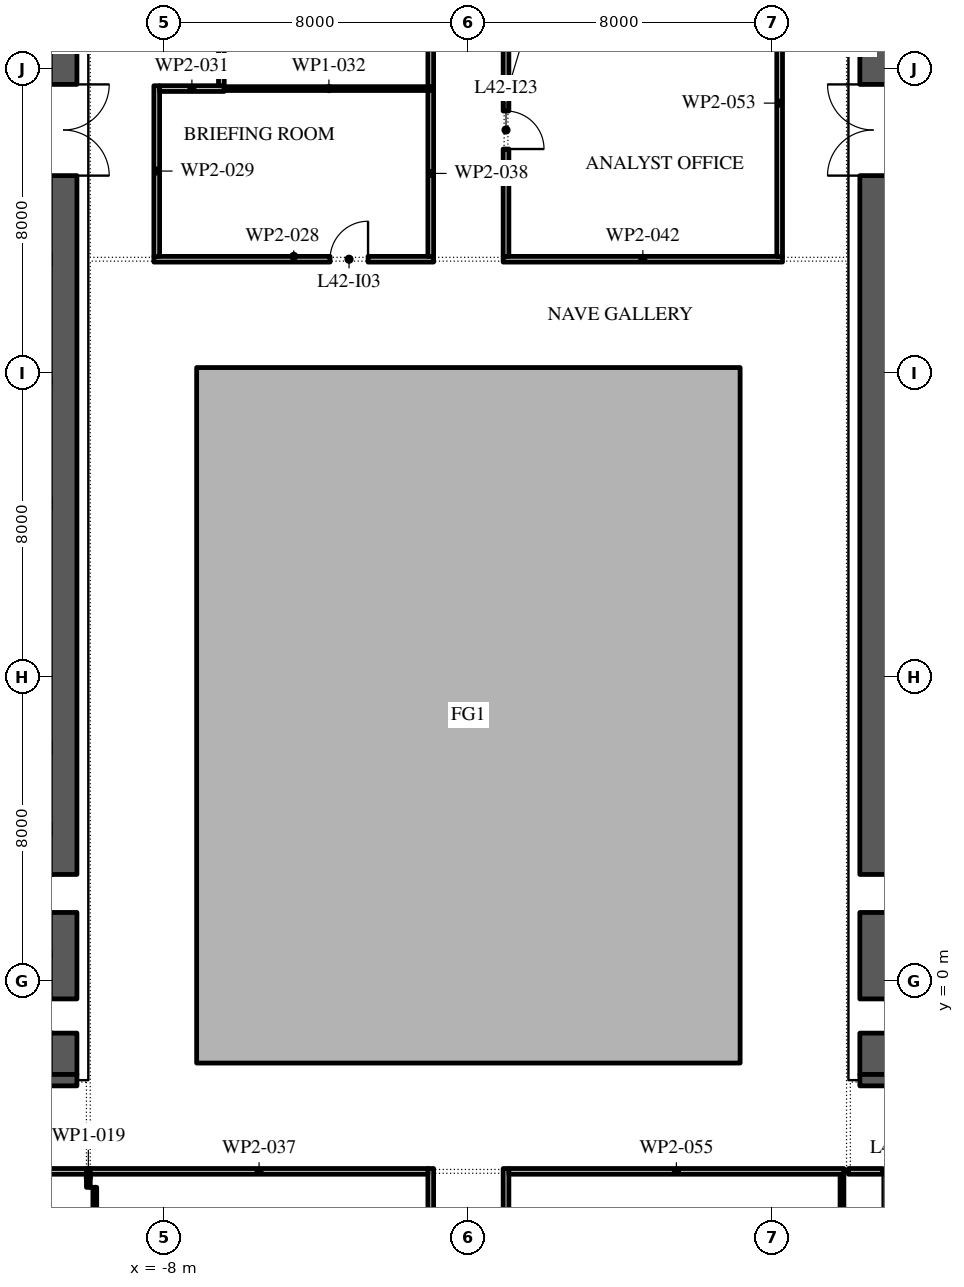
"""IFC4 building model, lengths in metres.
Left out: names, types, materials, properties, quantities, classifications, styles, units other than length and angle.
Written with IfcOpenShell. Run it as: python <this file> out.ifc"""

import sys

from ifc_helpers import new_model, si_unit, direction, frame, frame_2d, origin, place, context, subcontext, project, spatial, polyline, rectangle, outline, extrude, element, fill, save


model = new_model("IFC4")
c1 = context("Model", 3, precision=1e-05, world=origin(), true_north=direction((0.0, 1.0)))
c2 = subcontext(c1, "Body", "Model", "MODEL_VIEW")
j1 = project(units=[si_unit("LENGTHUNIT", "METRE"), si_unit("PLANEANGLEUNIT", "RADIAN")], contexts=[c1])
p1 = place(None, origin())
s1 = spatial("IfcSite", under=j1, at=p1, CompositionType="ELEMENT")
p2 = place(p1, origin())
s2 = spatial("IfcBuilding", under=s1, at=p2, CompositionType="ELEMENT")
p3 = place(p2, frame((0.0, 0.0, 192.6)))
s3 = spatial("IfcBuildingStorey", under=s2, at=p3, CompositionType="ELEMENT", Elevation=192.6)
p4 = place(p3, origin())
e1 = element("IfcWall", 1, at=p4, inside=s3, PredefinedType="STANDARD", context=c2, shape_type="SweptSolid", body=[
    extrude(outline(polyline([(-7.15, -2.15), (7.15, -2.15), (7.15, 16.15), (-7.15, 16.15), (-7.15, -2.15)]), holes=[polyline([(-7.0, -2.0), (-7.0, 16.0), (7.0, 16.0), (7.0, -2.0), (-7.0, -2.0)])]), origin(), (0.0, 0.0, 1.0), 4.0),
])
p5 = place(p3, frame((-10.65, -2.45, 0.0), z_axis=(0.0, 0.0, 1.0), x_axis=(0.0, 1.0, 0.0)))
e2 = element("IfcWall", 2, at=p5, inside=s3, PredefinedType="SHEAR", context=c2, shape_type="SweptSolid", body=[
    extrude(rectangle(XDim=27.9, YDim=0.7, at=frame_2d((13.95, 0.0))), origin(), (0.0, 0.0, 1.0), 4.0),
])
p6 = place(p5, frame((23.65, 0.0, 0.0)))
e3 = element("IfcOpeningElement", 3, at=p6, cuts=e2, PredefinedType="OPENING", context=c2, shape_type="SweptSolid", body=[
    extrude(rectangle(XDim=2.4, YDim=2.1, at=frame_2d((1.2, 1.05))), frame((0.0, 0.36, 0.0), z_axis=(0.0, -1.0, 0.0), x_axis=(1.0, 0.0, 0.0)), (0.0, 0.0, 1.0), 0.72),
])
p7 = place(p5, frame((1.087, 0.0, 0.0)))
e4 = element("IfcOpeningElement", 4, at=p7, cuts=e2, PredefinedType="OPENING", context=c2, shape_type="SweptSolid", body=[
    extrude(rectangle(XDim=0.9, YDim=2.1, at=frame_2d((0.45, 1.05))), frame((0.0, 0.36, 0.0), z_axis=(0.0, -1.0, 0.0), x_axis=(1.0, 0.0, 0.0)), (0.0, 0.0, 1.0), 0.72),
])
p8 = place(p5, frame((4.262, 0.0, 0.0)))
e5 = element("IfcOpeningElement", 5, at=p8, cuts=e2, PredefinedType="OPENING", context=c2, shape_type="SweptSolid", body=[
    extrude(rectangle(XDim=1.0, YDim=2.1, at=frame_2d((0.5, 1.05))), frame((0.0, 0.36, 0.0), z_axis=(0.0, -1.0, 0.0), x_axis=(1.0, 0.0, 0.0)), (0.0, 0.0, 1.0), 0.72),
])
p9 = place(p3, frame((-21.7, -2.6, 0.0), z_axis=(0.0, 0.0, 1.0), x_axis=(1.0, 0.0, 0.0)))
e6 = element("IfcWall", 6, at=p9, inside=s3, PredefinedType="SHEAR", context=c2, shape_type="SweptSolid", body=[
    extrude(rectangle(XDim=11.4, YDim=0.3, at=frame_2d((5.7, 0.0))), origin(), (0.0, 0.0, 1.0), 4.0),
])
p10 = place(p3, frame((10.65, -2.45, 0.0), z_axis=(0.0, 0.0, 1.0), x_axis=(0.0, 1.0, 0.0)))
e7 = element("IfcWall", 7, at=p10, inside=s3, PredefinedType="SHEAR", context=c2, shape_type="SweptSolid", body=[
    extrude(rectangle(XDim=27.9, YDim=0.7, at=frame_2d((13.95, 0.0))), origin(), (0.0, 0.0, 1.0), 4.0),
])
p11 = place(p10, frame((23.65, 0.0, 0.0)))
e8 = element("IfcOpeningElement", 8, at=p11, cuts=e7, PredefinedType="OPENING", context=c2, shape_type="SweptSolid", body=[
    extrude(rectangle(XDim=2.4, YDim=2.1, at=frame_2d((1.2, 1.05))), frame((0.0, 0.36, 0.0), z_axis=(0.0, -1.0, 0.0), x_axis=(1.0, 0.0, 0.0)), (0.0, 0.0, 1.0), 0.72),
])
p12 = place(p10, frame((1.087, 0.0, 0.0)))
e9 = element("IfcOpeningElement", 9, at=p12, cuts=e7, PredefinedType="OPENING", context=c2, shape_type="SweptSolid", body=[
    extrude(rectangle(XDim=0.9, YDim=2.1, at=frame_2d((0.45, 1.05))), frame((0.0, 0.36, 0.0), z_axis=(0.0, -1.0, 0.0), x_axis=(1.0, 0.0, 0.0)), (0.0, 0.0, 1.0), 0.72),
])
p13 = place(p10, frame((4.262, 0.0, 0.0)))
e10 = element("IfcOpeningElement", 10, at=p13, cuts=e7, PredefinedType="OPENING", context=c2, shape_type="SweptSolid", body=[
    extrude(rectangle(XDim=1.0, YDim=2.1, at=frame_2d((0.5, 1.05))), frame((0.0, 0.36, 0.0), z_axis=(0.0, -1.0, 0.0), x_axis=(1.0, 0.0, 0.0)), (0.0, 0.0, 1.0), 0.72),
])
p14 = place(p3, frame((10.3, -2.6, 0.0), z_axis=(0.0, 0.0, 1.0), x_axis=(1.0, 0.0, 0.0)))
e11 = element("IfcWall", 11, at=p14, inside=s3, PredefinedType="SHEAR", context=c2, shape_type="SweptSolid", body=[
    extrude(rectangle(XDim=11.4, YDim=0.3, at=frame_2d((5.7, 0.0))), origin(), (0.0, 0.0, 1.0), 4.0),
])
p15 = place(p3, frame((-10.0, -5.42, 0.0), z_axis=(0.0, 0.0, 1.0), x_axis=(0.0, 1.0, 0.0)))
e12 = element("IfcWall", 12, at=p15, inside=s3, PredefinedType="PARTITIONING", context=c2, shape_type="SweptSolid", body=[
    extrude(rectangle(XDim=0.495, YDim=0.1, at=frame_2d((0.248, 0.0))), origin(), (0.0, 0.0, 1.0), 4.0),
])
p16 = place(p3, frame((-10.05, -5.0, 0.0), z_axis=(0.0, 0.0, 1.0), x_axis=(-1.0, 0.0, 0.0)))
e13 = element("IfcWall", 13, at=p16, inside=s3, PredefinedType="PARTITIONING", context=c2, shape_type="SweptSolid", body=[
    extrude(rectangle(XDim=13.665, YDim=0.15, at=frame_2d((6.833, 0.0))), origin(), (0.0, 0.0, 1.0), 4.0),
])
p17 = place(p16, frame((5.09, 0.0, 0.0)))
e14 = element("IfcOpeningElement", 14, at=p17, cuts=e13, PredefinedType="OPENING", context=c2, shape_type="SweptSolid", body=[
    extrude(rectangle(XDim=1.0, YDim=2.1, at=frame_2d((0.5, 1.05))), frame((0.0, 0.085, 0.0), z_axis=(0.0, -1.0, 0.0), x_axis=(1.0, 0.0, 0.0)), (0.0, 0.0, 1.0), 0.17),
])
p18 = place(p3, frame((-9.83, -11.12, 0.0), z_axis=(0.0, 0.0, 1.0), x_axis=(0.0, 1.0, 0.0)))
e15 = element("IfcWall", 15, at=p18, inside=s3, PredefinedType="PARTITIONING", context=c2, shape_type="SweptSolid", body=[
    extrude(rectangle(XDim=5.7, YDim=0.1, at=frame_2d((2.85, 0.0))), origin(), (0.0, 0.0, 1.0), 4.0),
])
p19 = place(p3, frame((-8.275, 19.0, 0.0), z_axis=(0.0, 0.0, 1.0), x_axis=(1.0, 0.0, 0.0)))
e16 = element("IfcWall", 16, at=p19, inside=s3, PredefinedType="PARTITIONING", context=c2, shape_type="SweptSolid", body=[
    extrude(rectangle(XDim=7.36, YDim=0.15, at=frame_2d((3.68, 0.0))), origin(), (0.0, 0.0, 1.0), 4.0),
])
p20 = place(p19, frame((4.635, 0.0, 0.0)))
e17 = element("IfcOpeningElement", 17, at=p20, cuts=e16, PredefinedType="OPENING", context=c2, shape_type="SweptSolid", body=[
    extrude(rectangle(XDim=1.0, YDim=2.1, at=frame_2d((0.5, 1.05))), frame((0.0, 0.085, 0.0), z_axis=(0.0, -1.0, 0.0), x_axis=(1.0, 0.0, 0.0)), (0.0, 0.0, 1.0), 0.17),
])
p21 = place(p3, frame((-8.2, 23.565, 0.0), z_axis=(0.0, 0.0, 1.0), x_axis=(0.0, -1.0, 0.0)))
e18 = element("IfcWall", 18, at=p21, inside=s3, PredefinedType="PARTITIONING", context=c2, shape_type="SweptSolid", body=[
    extrude(rectangle(XDim=4.49, YDim=0.15, at=frame_2d((2.245, 0.0))), origin(), (0.0, 0.0, 1.0), 4.0),
])
p22 = place(p3, frame((-6.425, 23.49, 0.0), z_axis=(0.0, 0.0, 1.0), x_axis=(-1.0, 0.0, 0.0)))
e19 = element("IfcWall", 19, at=p22, inside=s3, PredefinedType="PARTITIONING", context=c2, shape_type="SweptSolid", body=[
    extrude(rectangle(XDim=1.7, YDim=0.15, at=frame_2d((0.85, 0.0))), origin(), (0.0, 0.0, 1.0), 4.0),
])
p23 = place(p3, frame((-6.425, 23.49, 0.0), z_axis=(0.0, 0.0, 1.0), x_axis=(1.0, 0.0, 0.0)))
e20 = element("IfcWall", 20, at=p23, inside=s3, PredefinedType="PARTITIONING", context=c2, shape_type="SweptSolid", body=[
    extrude(rectangle(XDim=5.51, YDim=0.1, at=frame_2d((2.755, 0.0))), origin(), (0.0, 0.0, 1.0), 4.0),
])
p24 = place(p3, frame((-6.5, 27.115, 0.0), z_axis=(0.0, 0.0, 1.0), x_axis=(0.0, -1.0, 0.0)))
e21 = element("IfcWall", 21, at=p24, inside=s3, PredefinedType="PARTITIONING", context=c2, shape_type="SweptSolid", body=[
    extrude(rectangle(XDim=3.55, YDim=0.15, at=frame_2d((1.775, 0.0))), origin(), (0.0, 0.0, 1.0), 4.0),
])
p25 = place(p3, frame((-0.99, -16.753, 0.0), z_axis=(0.0, 0.0, 1.0), x_axis=(0.0, 1.0, 0.0)))
e22 = element("IfcWall", 22, at=p25, inside=s3, PredefinedType="PARTITIONING", context=c2, shape_type="SweptSolid", body=[
    extrude(rectangle(XDim=11.828, YDim=0.15, at=frame_2d((5.914, 0.0))), origin(), (0.0, 0.0, 1.0), 4.0),
])
p26 = place(p25, frame((2.853, 0.0, 0.0)))
e23 = element("IfcOpeningElement", 23, at=p26, cuts=e22, PredefinedType="OPENING", context=c2, shape_type="SweptSolid", body=[
    extrude(rectangle(XDim=1.0, YDim=2.1, at=frame_2d((0.5, 1.05))), frame((0.0, 0.085, 0.0), z_axis=(0.0, -1.0, 0.0), x_axis=(1.0, 0.0, 0.0)), (0.0, 0.0, 1.0), 0.17),
])
p27 = place(p3, frame((-1.065, -5.0, 0.0), z_axis=(0.0, 0.0, 1.0), x_axis=(-1.0, 0.0, 0.0)))
e24 = element("IfcWall", 24, at=p27, inside=s3, PredefinedType="PARTITIONING", context=c2, shape_type="SweptSolid", body=[
    extrude(rectangle(XDim=8.885, YDim=0.15, at=frame_2d((4.442, 0.0))), origin(), (0.0, 0.0, 1.0), 4.0),
])
p28 = place(p3, frame((-0.99, 19.075, 0.0), z_axis=(0.0, 0.0, 1.0), x_axis=(0.0, 1.0, 0.0)))
e25 = element("IfcWall", 25, at=p28, inside=s3, PredefinedType="PARTITIONING", context=c2, shape_type="SweptSolid", body=[
    extrude(rectangle(XDim=4.365, YDim=0.15, at=frame_2d((2.183, 0.0))), origin(), (0.0, 0.0, 1.0), 4.0),
])
p29 = place(p3, frame((-0.99, 23.54, 0.0), z_axis=(0.0, 0.0, 1.0), x_axis=(0.0, 1.0, 0.0)))
e26 = element("IfcWall", 26, at=p29, inside=s3, PredefinedType="PARTITIONING", context=c2, shape_type="SweptSolid", body=[
    extrude(rectangle(XDim=6.83, YDim=0.15, at=frame_2d((3.415, 0.0))), origin(), (0.0, 0.0, 1.0), 4.0),
])
p30 = place(p29, frame((3.73, 0.0, 0.0)))
e27 = element("IfcOpeningElement", 27, at=p30, cuts=e26, PredefinedType="OPENING", context=c2, shape_type="SweptSolid", body=[
    extrude(rectangle(XDim=1.0, YDim=2.1, at=frame_2d((0.5, 1.05))), frame((0.0, 0.085, 0.0), z_axis=(0.0, -1.0, 0.0), x_axis=(1.0, 0.0, 0.0)), (0.0, 0.0, 1.0), 0.17),
])
p31 = place(p3, frame((0.99, -4.925, 0.0), z_axis=(0.0, 0.0, 1.0), x_axis=(0.0, -1.0, 0.0)))
e28 = element("IfcWall", 28, at=p31, inside=s3, PredefinedType="PARTITIONING", context=c2, shape_type="SweptSolid", body=[
    extrude(rectangle(XDim=11.371, YDim=0.15, at=frame_2d((5.686, 0.0))), origin(), (0.0, 0.0, 1.0), 4.0),
])
p32 = place(p31, frame((2.945, 0.0, 0.0)))
e29 = element("IfcOpeningElement", 29, at=p32, cuts=e28, PredefinedType="OPENING", context=c2, shape_type="SweptSolid", body=[
    extrude(rectangle(XDim=1.0, YDim=2.1, at=frame_2d((0.5, 1.05))), frame((0.0, 0.085, 0.0), z_axis=(0.0, -1.0, 0.0), x_axis=(1.0, 0.0, 0.0)), (0.0, 0.0, 1.0), 0.17),
])
p33 = place(p3, frame((0.915, 19.0, 0.0), z_axis=(0.0, 0.0, 1.0), x_axis=(1.0, 0.0, 0.0)))
e30 = element("IfcWall", 30, at=p33, inside=s3, PredefinedType="PARTITIONING", context=c2, shape_type="SweptSolid", body=[
    extrude(rectangle(XDim=7.35, YDim=0.15, at=frame_2d((3.675, 0.0))), origin(), (0.0, 0.0, 1.0), 4.0),
])
p34 = place(p3, frame((0.99, 27.55, 0.0), z_axis=(0.0, 0.0, 1.0), x_axis=(0.0, -1.0, 0.0)))
e31 = element("IfcWall", 31, at=p34, inside=s3, PredefinedType="PARTITIONING", context=c2, shape_type="SweptSolid", body=[
    extrude(rectangle(XDim=8.475, YDim=0.15, at=frame_2d((4.238, 0.0))), origin(), (0.0, 0.0, 1.0), 4.0),
])
p35 = place(p34, frame((4.65, 0.0, 0.0)))
e32 = element("IfcOpeningElement", 32, at=p35, cuts=e31, PredefinedType="OPENING", context=c2, shape_type="SweptSolid", body=[
    extrude(rectangle(XDim=1.0, YDim=2.1, at=frame_2d((0.5, 1.05))), frame((0.0, 0.085, 0.0), z_axis=(0.0, -1.0, 0.0), x_axis=(1.0, 0.0, 0.0)), (0.0, 0.0, 1.0), 0.17),
])
p36 = place(p3, frame((8.19, 19.075, 0.0), z_axis=(0.0, 0.0, 1.0), x_axis=(0.0, 1.0, 0.0)))
e33 = element("IfcWall", 33, at=p36, inside=s3, PredefinedType="PARTITIONING", context=c2, shape_type="SweptSolid", body=[
    extrude(rectangle(XDim=8.065, YDim=0.15, at=frame_2d((4.032, 0.0))), origin(), (0.0, 0.0, 1.0), 4.0),
])
p37 = place(p3, frame((9.88, -5.0, 0.0), z_axis=(0.0, 0.0, 1.0), x_axis=(-1.0, 0.0, 0.0)))
e34 = element("IfcWall", 34, at=p37, inside=s3, PredefinedType="PARTITIONING", context=c2, shape_type="SweptSolid", body=[
    extrude(rectangle(XDim=8.815, YDim=0.15, at=frame_2d((4.407, 0.0))), origin(), (0.0, 0.0, 1.0), 4.0),
])
p38 = place(p3, frame((9.83, -5.075, 0.0), z_axis=(0.0, 0.0, 1.0), x_axis=(0.0, -1.0, 0.0)))
e35 = element("IfcWall", 35, at=p38, inside=s3, PredefinedType="PARTITIONING", context=c2, shape_type="SweptSolid", body=[
    extrude(rectangle(XDim=9.18, YDim=0.1, at=frame_2d((4.59, 0.0))), origin(), (0.0, 0.0, 1.0), 4.0),
])
p39 = place(p3, frame((14.43, -5.0, 0.0), z_axis=(0.0, 0.0, 1.0), x_axis=(-1.0, 0.0, 0.0)))
e36 = element("IfcWall", 36, at=p39, inside=s3, PredefinedType="PARTITIONING", context=c2, shape_type="SweptSolid", body=[
    extrude(rectangle(XDim=4.43, YDim=0.15, at=frame_2d((2.215, 0.0))), origin(), (0.0, 0.0, 1.0), 4.0),
])
p40 = place(p39, frame((2.53, 0.0, 0.0)))
e37 = element("IfcOpeningElement", 37, at=p40, cuts=e36, PredefinedType="OPENING", context=c2, shape_type="SweptSolid", body=[
    extrude(rectangle(XDim=1.0, YDim=2.1, at=frame_2d((0.5, 1.05))), frame((0.0, 0.085, 0.0), z_axis=(0.0, -1.0, 0.0), x_axis=(1.0, 0.0, 0.0)), (0.0, 0.0, 1.0), 0.17),
])
p41 = place(p6, frame((2.4, 0.0, 0.0), z_axis=(0.0, 0.0, 1.0), x_axis=(-1.0, 0.0, 0.0)))
e38 = element("IfcDoor", 38, at=p41, inside=s3, OperationType="DOUBLE_DOOR_SINGLE_SWING", PredefinedType="DOOR", context=c2, shape_type="SweptSolid", body=[
    extrude(rectangle(XDim=2.4, YDim=2.1, at=frame_2d((1.2, 1.05))), frame((0.0, 0.025, 0.0), z_axis=(0.0, -1.0, 0.0), x_axis=(1.0, 0.0, 0.0)), (0.0, 0.0, 1.0), 0.05),
])
fill(e3, e38)
p42 = place(p11, origin())
e39 = element("IfcDoor", 39, at=p42, inside=s3, OperationType="DOUBLE_DOOR_SINGLE_SWING", PredefinedType="DOOR", context=c2, shape_type="SweptSolid", body=[
    extrude(rectangle(XDim=2.4, YDim=2.1, at=frame_2d((1.2, 1.05))), frame((0.0, 0.025, 0.0), z_axis=(0.0, -1.0, 0.0), x_axis=(1.0, 0.0, 0.0)), (0.0, 0.0, 1.0), 0.05),
])
fill(e8, e39)
p43 = place(p20, origin())
e40 = element("IfcDoor", 40, at=p43, inside=s3, OperationType="SINGLE_SWING_LEFT", PredefinedType="DOOR", context=c2, shape_type="SweptSolid", body=[
    extrude(rectangle(XDim=1.0, YDim=2.1, at=frame_2d((0.5, 1.05))), frame((0.0, 0.025, 0.0), z_axis=(0.0, -1.0, 0.0), x_axis=(1.0, 0.0, 0.0)), (0.0, 0.0, 1.0), 0.05),
])
fill(e17, e40)
p44 = place(p40, origin())
e41 = element("IfcDoor", 41, at=p44, inside=s3, OperationType="SINGLE_SWING_LEFT", PredefinedType="DOOR", context=c2, shape_type="SweptSolid", body=[
    extrude(rectangle(XDim=1.0, YDim=2.1, at=frame_2d((0.5, 1.05))), frame((0.0, 0.025, 0.0), z_axis=(0.0, -1.0, 0.0), x_axis=(1.0, 0.0, 0.0)), (0.0, 0.0, 1.0), 0.05),
])
fill(e37, e41)
p45 = place(p35, origin())
e42 = element("IfcDoor", 42, at=p45, inside=s3, OperationType="SINGLE_SWING_LEFT", PredefinedType="DOOR", context=c2, shape_type="SweptSolid", body=[
    extrude(rectangle(XDim=1.0, YDim=2.1, at=frame_2d((0.5, 1.05))), frame((0.0, 0.025, 0.0), z_axis=(0.0, -1.0, 0.0), x_axis=(1.0, 0.0, 0.0)), (0.0, 0.0, 1.0), 0.05),
])
fill(e32, e42)
save(model, sys.argv[1])
